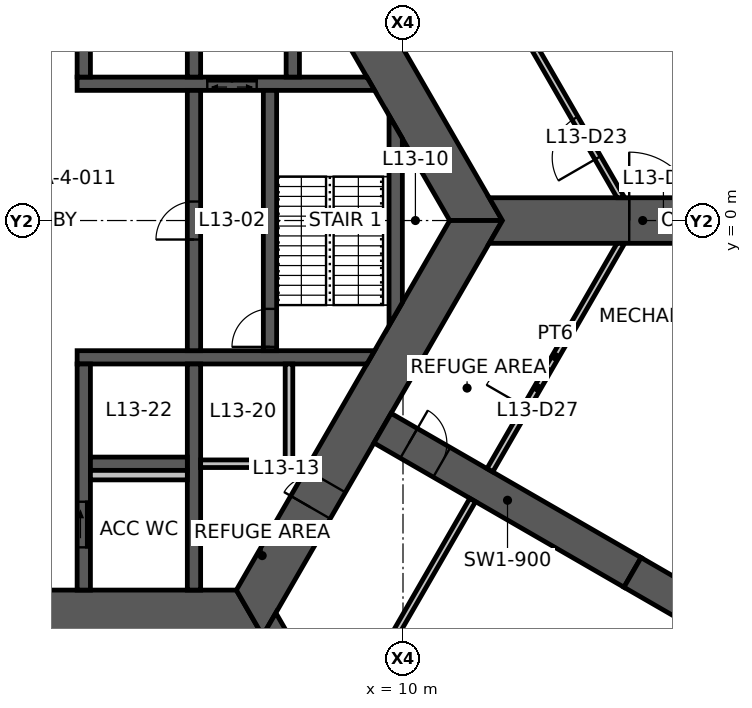
"""IFC4 building model, lengths in metres.
Left out: names, types, materials, properties, quantities, classifications, styles, units other than length and angle.
Written with IfcOpenShell. Run it as: python <this file> out.ifc"""

import sys

from ifc_helpers import new_model, si_unit, direction, frame, frame_2d, origin, place, context, subcontext, project, spatial, polyline, rectangle, outline, extrude, element, fill, save


model = new_model("IFC4")
c1 = context("Model", 3, precision=1e-05, world=origin(), true_north=direction((0.0, 1.0)))
c2 = subcontext(c1, "Body", "Model", "MODEL_VIEW")
j1 = project(units=[si_unit("LENGTHUNIT", "METRE"), si_unit("PLANEANGLEUNIT", "RADIAN")], contexts=[c1])
p1 = place(None, origin())
s1 = spatial("IfcSite", under=j1, at=p1, CompositionType="ELEMENT")
p2 = place(p1, origin())
s2 = spatial("IfcBuilding", under=s1, at=p2, CompositionType="ELEMENT")
p3 = place(p2, frame((0.0, 0.0, 52.0)))
s3 = spatial("IfcBuildingStorey", under=s2, at=p3, CompositionType="ELEMENT", Elevation=52.0)
p4 = place(p3, frame((11.922, 0.0, 0.0), z_axis=(0.0, 0.0, 1.0), x_axis=(-0.500004296715, 0.866022923061, 0.0)))
e1 = element("IfcWall", 1, at=p4, inside=s3, PredefinedType="SHEAR", context=c2, shape_type="SweptSolid", body=[
    extrude(outline(polyline([(-0.346, -0.6), (5.835, -0.6), (6.635, -0.6), (12.269, -0.6), (11.576, 0.6), (6.635, 0.6), (5.835, 0.6), (0.346, 0.6), (-0.346, -0.6)])), origin(), (0.0, 0.0, 1.0), 5.0),
])
p5 = place(p4, frame((5.835, 0.0, 0.0)))
e2 = element("IfcOpeningElement", 2, at=p5, cuts=e1, PredefinedType="OPENING", context=c2, shape_type="SweptSolid", body=[
    extrude(rectangle(XDim=0.8, YDim=2.1, at=frame_2d((0.4, 1.05))), frame((0.0, 0.61, 0.0), z_axis=(0.0, -1.0, 0.0), x_axis=(1.0, 0.0, 0.0)), (0.0, 0.0, 1.0), 1.22),
])
p6 = place(p3, frame((-5.961, -10.325, 0.0), z_axis=(0.0, 0.0, 1.0), x_axis=(1.0, 0.0, 0.0)))
e3 = element("IfcWall", 3, at=p6, inside=s3, PredefinedType="SHEAR", context=c2, shape_type="SweptSolid", body=[
    extrude(outline(polyline([(-0.346, -0.6), (5.461, -0.6), (6.461, -0.6), (12.269, -0.6), (11.576, 0.6), (6.461, 0.6), (5.461, 0.6), (0.346, 0.6), (-0.346, -0.6)])), origin(), (0.0, 0.0, 1.0), 5.0),
])
p7 = place(p6, frame((5.461, 0.0, 0.0)))
e4 = element("IfcOpeningElement", 4, at=p7, cuts=e3, PredefinedType="OPENING", context=c2, shape_type="SweptSolid", body=[
    extrude(rectangle(XDim=1.0, YDim=2.1, at=frame_2d((0.5, 1.05))), frame((0.0, 0.61, 0.0), z_axis=(0.0, -1.0, 0.0), x_axis=(1.0, 0.0, 0.0)), (0.0, 0.0, 1.0), 1.22),
])
p8 = place(p3, frame((5.961, -10.325, 0.0), z_axis=(0.0, 0.0, 1.0), x_axis=(0.500004296715, 0.866022923061, 0.0)))
e5 = element("IfcWall", 5, at=p8, inside=s3, PredefinedType="SHEAR", context=c2, shape_type="SweptSolid", body=[
    extrude(outline(polyline([(-0.346, -0.6), (3.208, -0.6), (4.009, -0.6), (12.269, -0.6), (11.576, 0.6), (4.009, 0.6), (3.208, 0.6), (0.346, 0.6), (-0.346, -0.6)])), origin(), (0.0, 0.0, 1.0), 5.0),
])
p9 = place(p8, frame((3.208, 0.0, 0.0)))
e6 = element("IfcOpeningElement", 6, at=p9, cuts=e5, PredefinedType="OPENING", context=c2, shape_type="SweptSolid", body=[
    extrude(rectangle(XDim=0.8, YDim=2.1, at=frame_2d((0.4, 1.05))), frame((0.0, 0.61, 0.0), z_axis=(0.0, -1.0, 0.0), x_axis=(1.0, 0.0, 0.0)), (0.0, 0.0, 1.0), 1.22),
])
p10 = place(p3, frame((9.461, -5.462, 0.0), z_axis=(0.0, 0.0, 1.0), x_axis=(0.866019116917, -0.500010889016, 0.0)))
e7 = element("IfcWall", 7, at=p10, inside=s3, PredefinedType="SHEAR", context=c2, shape_type="SweptSolid", body=[
    extrude(rectangle(XDim=7.595, YDim=0.9, at=frame_2d((3.798, 0.0))), origin(), (0.0, 0.0, 1.0), 5.0),
])
p11 = place(p10, frame((0.8, 0.0, 0.0)))
e8 = element("IfcOpeningElement", 8, at=p11, cuts=e7, PredefinedType="OPENING", context=c2, shape_type="SweptSolid", body=[
    extrude(rectangle(XDim=1.0, YDim=2.1, at=frame_2d((0.5, 1.05))), frame((0.0, 0.46, 0.0), z_axis=(0.0, -1.0, 0.0), x_axis=(1.0, 0.0, 0.0)), (0.0, 0.0, 1.0), 0.92),
])
p12 = place(p3, frame((16.039, -9.26, 0.0), z_axis=(0.0, 0.0, 1.0), x_axis=(0.866024837091, -0.50000098154, 0.0)))
e9 = element("IfcWall", 9, at=p12, inside=s3, PredefinedType="SHEAR", context=c2, shape_type="SweptSolid", body=[
    extrude(rectangle(XDim=13.0, YDim=0.9, at=frame_2d((6.5, 0.0))), origin(), (0.0, 0.0, 1.0), 5.0),
])
p13 = place(p3, frame((12.615, 0.0, -1.15), z_axis=(0.0, 0.0, 1.0), x_axis=(1.0, 0.0, 0.0)))
e10 = element("IfcWall", 10, at=p13, inside=s3, PredefinedType="SHEAR", context=c2, shape_type="SweptSolid", body=[
    extrude(outline(polyline([(-0.346, -0.6), (3.338, -0.6), (5.138, -0.6), (7.385, -0.6), (7.385, 0.6), (5.138, 0.6), (3.338, 0.6), (-0.346, 0.6), (0.0, 0.0), (-0.346, -0.6)])), origin(), (0.0, 0.0, 1.0), 6.15),
])
p14 = place(p13, frame((3.338, 0.0, 1.15)))
e11 = element("IfcOpeningElement", 11, at=p14, cuts=e10, PredefinedType="OPENING", context=c2, shape_type="SweptSolid", body=[
    extrude(rectangle(XDim=1.8, YDim=2.4, at=frame_2d((0.9, 1.2))), frame((0.0, 0.61, 0.0), z_axis=(0.0, -1.0, 0.0), x_axis=(1.0, 0.0, 0.0)), (0.0, 0.0, 1.0), 1.22),
])
p15 = place(p3, frame((6.308, -10.925, -1.15), z_axis=(0.0, 0.0, 1.0), x_axis=(0.499993363642, -0.866029235253, 0.0)))
e12 = element("IfcWall", 12, at=p15, inside=s3, PredefinedType="SHEAR", context=c2, shape_type="SweptSolid", body=[
    extrude(outline(polyline([(-0.346, -0.6), (7.385, -0.6), (7.385, 0.6), (-0.346, 0.6), (0.0, 0.0), (-0.346, -0.6)])), origin(), (0.0, 0.0, 1.0), 6.15),
])
p16 = place(p3, frame((20.389, 0.526, 0.0), z_axis=(0.0, 0.0, 1.0), x_axis=(-0.499999841607, 0.866025495233, 0.0)))
e13 = element("IfcWall", 13, at=p16, inside=s3, PredefinedType="ELEMENTEDWALL", context=c2, shape_type="SweptSolid", body=[
    extrude(rectangle(XDim=19.479, YDim=0.2, at=frame_2d((9.739, 0.0))), origin(), (0.0, 0.0, 1.0), 5.0),
])
p17 = place(p3, frame((1.425, 3.6, 0.0), z_axis=(0.0, 0.0, 1.0), x_axis=(1.0, 0.0, 0.0)))
e14 = element("IfcWall", 14, at=p17, inside=s3, PredefinedType="SHEAR", context=c2, shape_type="SweptSolid", body=[
    extrude(outline(polyline([(0.0, -0.175), (3.425, -0.175), (4.725, -0.175), (7.827, -0.175), (7.625, 0.175), (4.725, 0.175), (3.425, 0.175), (0.0, 0.175), (0.0, -0.175)])), origin(), (0.0, 0.0, 1.0), 5.0),
])
p18 = place(p17, frame((3.425, 0.0, 0.0)))
e15 = element("IfcOpeningElement", 15, at=p18, cuts=e14, PredefinedType="OPENING", context=c2, shape_type="SweptSolid", body=[
    extrude(rectangle(XDim=1.3, YDim=2.1, at=frame_2d((0.65, 1.05))), frame((0.0, 0.185, 0.0), z_axis=(0.0, -1.0, 0.0), x_axis=(1.0, 0.0, 0.0)), (0.0, 0.0, 1.0), 0.37),
])
p19 = place(p3, frame((1.425, -3.6, 0.0), z_axis=(0.0, 0.0, 1.0), x_axis=(1.0, 0.0, 0.0)))
e16 = element("IfcWall", 16, at=p19, inside=s3, PredefinedType="SHEAR", context=c2, shape_type="SweptSolid", body=[
    extrude(outline(polyline([(0.0, -0.175), (7.625, -0.175), (7.827, 0.175), (0.0, 0.175), (0.0, -0.175)])), origin(), (0.0, 0.0, 1.0), 5.0),
])
p20 = place(p3, frame((1.6, 3.775, 0.0), z_axis=(0.0, 0.0, 1.0), x_axis=(0.0, 1.0, 0.0)))
e17 = element("IfcWall", 17, at=p20, inside=s3, PredefinedType="SHEAR", context=c2, shape_type="SweptSolid", body=[
    extrude(rectangle(XDim=5.95, YDim=0.35, at=frame_2d((2.975, 0.0))), origin(), (0.0, 0.0, 1.0), 5.0),
])
p21 = place(p20, frame((3.775, 0.0, 0.0)))
e18 = element("IfcOpeningElement", 18, at=p21, cuts=e17, PredefinedType="OPENING", context=c2, shape_type="SweptSolid", body=[
    extrude(rectangle(XDim=0.9, YDim=2.1, at=frame_2d((0.45, 1.05))), frame((0.0, 0.185, 0.0), z_axis=(0.0, -1.0, 0.0), x_axis=(1.0, 0.0, 0.0)), (0.0, 0.0, 1.0), 0.37),
])
p22 = place(p3, frame((1.6, -3.775, 0.0), z_axis=(0.0, 0.0, 1.0), x_axis=(0.0, -1.0, 0.0)))
e19 = element("IfcWall", 19, at=p22, inside=s3, PredefinedType="SHEAR", context=c2, shape_type="SweptSolid", body=[
    extrude(rectangle(XDim=5.95, YDim=0.35, at=frame_2d((2.975, 0.0))), origin(), (0.0, 0.0, 1.0), 5.0),
])
p23 = place(p22, frame((3.625, 0.0, 0.0)))
e20 = element("IfcOpeningElement", 20, at=p23, cuts=e19, PredefinedType="OPENING", context=c2, shape_type="SweptSolid", body=[
    extrude(rectangle(XDim=1.2, YDim=2.1, at=frame_2d((0.6, 1.05))), frame((0.0, 0.185, 0.0), z_axis=(0.0, -1.0, 0.0), x_axis=(1.0, 0.0, 0.0)), (0.0, 0.0, 1.0), 0.37),
])
p24 = place(p3, frame((4.5, -3.425, 0.0), z_axis=(0.0, 0.0, 1.0), x_axis=(0.0, 1.0, 0.0)))
e21 = element("IfcWall", 21, at=p24, inside=s3, PredefinedType="SHEAR", context=c2, shape_type="SweptSolid", body=[
    extrude(rectangle(XDim=6.85, YDim=0.35, at=frame_2d((3.425, 0.0))), origin(), (0.0, 0.0, 1.0), 5.0),
])
p25 = place(p24, frame((2.925, 0.0, 0.0)))
e22 = element("IfcOpeningElement", 22, at=p25, cuts=e21, PredefinedType="OPENING", context=c2, shape_type="SweptSolid", body=[
    extrude(rectangle(XDim=1.0, YDim=2.1, at=frame_2d((0.5, 1.05))), frame((0.0, 0.185, 0.0), z_axis=(0.0, -1.0, 0.0), x_axis=(1.0, 0.0, 0.0)), (0.0, 0.0, 1.0), 0.37),
])
p26 = place(p3, frame((6.5, -3.425, 0.0), z_axis=(0.0, 0.0, 1.0), x_axis=(0.0, 1.0, 0.0)))
e23 = element("IfcWall", 23, at=p26, inside=s3, PredefinedType="SHEAR", context=c2, shape_type="SweptSolid", body=[
    extrude(rectangle(XDim=6.85, YDim=0.35, at=frame_2d((3.425, 0.0))), origin(), (0.0, 0.0, 1.0), 5.0),
])
p27 = place(p26, frame((0.1, 0.0, 0.0)))
e24 = element("IfcOpeningElement", 24, at=p27, cuts=e23, PredefinedType="OPENING", context=c2, shape_type="SweptSolid", body=[
    extrude(rectangle(XDim=1.0, YDim=2.1, at=frame_2d((0.5, 1.05))), frame((0.0, 0.185, 0.0), z_axis=(0.0, -1.0, 0.0), x_axis=(1.0, 0.0, 0.0)), (0.0, 0.0, 1.0), 0.37),
])
p28 = place(p3, frame((4.5, 3.775, 0.0), z_axis=(0.0, 0.0, 1.0), x_axis=(0.0, 1.0, 0.0)))
e25 = element("IfcWall", 25, at=p28, inside=s3, PredefinedType="SHEAR", context=c2, shape_type="SweptSolid", body=[
    extrude(rectangle(XDim=3.4, YDim=0.35, at=frame_2d((1.7, 0.0))), origin(), (0.0, 0.0, 1.0), 5.0),
])
p29 = place(p3, frame((4.5, -3.775, 0.0), z_axis=(0.0, 0.0, 1.0), x_axis=(0.0, -1.0, 0.0)))
e26 = element("IfcWall", 26, at=p29, inside=s3, PredefinedType="SHEAR", context=c2, shape_type="SweptSolid", body=[
    extrude(rectangle(XDim=5.95, YDim=0.35, at=frame_2d((2.975, 0.0))), origin(), (0.0, 0.0, 1.0), 5.0),
])
p30 = place(p3, frame((1.775, -6.4, 0.0), z_axis=(0.0, 0.0, 1.0), x_axis=(1.0, 0.0, 0.0)))
e27 = element("IfcWall", 27, at=p30, inside=s3, PredefinedType="SHEAR", context=c2, shape_type="SweptSolid", body=[
    extrude(rectangle(XDim=2.55, YDim=0.35, at=frame_2d((1.275, 0.0))), origin(), (0.0, 0.0, 1.0), 5.0),
])
p31 = place(p3, frame((7.1, 3.775, 0.0), z_axis=(0.0, 0.0, 1.0), x_axis=(0.0, 1.0, 0.0)))
e28 = element("IfcWall", 28, at=p31, inside=s3, PredefinedType="SHEAR", context=c2, shape_type="SweptSolid", body=[
    extrude(outline(polyline([(0.0, -0.175), (3.074, -0.175), (3.377, 0.0), (3.4, 0.175), (0.0, 0.175), (0.0, -0.175)])), origin(), (0.0, 0.0, 1.0), 5.0),
])
p32 = place(p3, frame((9.808, -2.462, 0.0), z_axis=(0.0, 0.0, 1.0), x_axis=(0.0, 1.0, 0.0)))
e29 = element("IfcWall", 29, at=p32, inside=s3, PredefinedType="SHEAR", context=c2, shape_type="SweptSolid", body=[
    extrude(outline(polyline([(0.303, -0.175), (4.621, -0.175), (5.228, 0.175), (-0.303, 0.175), (0.303, -0.175)])), origin(), (0.0, 0.0, 1.0), 5.0),
])
p33 = place(p3, frame((4.675, -6.4, 0.0), z_axis=(0.0, 0.0, 1.0), x_axis=(1.0, 0.0, 0.0)))
e30 = element("IfcWall", 30, at=p33, inside=s3, PredefinedType="STANDARD", context=c2, shape_type="SweptSolid", body=[
    extrude(rectangle(XDim=2.425, YDim=0.2, at=frame_2d((1.212, 0.0))), origin(), (0.0, 0.0, 1.0), 5.0),
])
p34 = place(p3, frame((7.0, -3.775, 0.0), z_axis=(0.0, 0.0, 1.0), x_axis=(0.0, -1.0, 0.0)))
e31 = element("IfcWall", 31, at=p34, inside=s3, PredefinedType="STANDARD", context=c2, shape_type="SweptSolid", body=[
    extrude(rectangle(XDim=2.525, YDim=0.2, at=frame_2d((1.263, 0.0))), origin(), (0.0, 0.0, 1.0), 5.0),
])
p35 = place(p3, frame((1.775, -6.7, 0.0), z_axis=(0.0, 0.0, 1.0), x_axis=(1.0, 0.0, 0.0)))
e32 = element("IfcWall", 32, at=p35, inside=s3, PredefinedType="PLUMBINGWALL", context=c2, shape_type="SweptSolid", body=[
    extrude(rectangle(XDim=2.55, YDim=0.25, at=frame_2d((1.275, 0.0))), origin(), (0.0, 0.0, 1.0), 5.0),
])
p36 = place(p3, frame((15.733, 0.6, 0.0), z_axis=(0.0, 0.0, 1.0), x_axis=(-0.49999908555, 0.866025931742, 0.0)))
e33 = element("IfcWall", 33, at=p36, inside=s3, PredefinedType="PARTITIONING", context=c2, shape_type="SweptSolid", body=[
    extrude(outline(polyline([(-0.051, -0.087), (1.213, -0.087), (2.413, -0.087), (14.744, -0.087), (14.643, 0.087), (2.413, 0.087), (1.213, 0.087), (0.051, 0.087), (-0.051, -0.087)])), origin(), (0.0, 0.0, 1.0), 4.83),
])
p37 = place(p36, frame((1.213, 0.0, 0.0)))
e34 = element("IfcOpeningElement", 34, at=p37, cuts=e33, PredefinedType="OPENING", context=c2, shape_type="SweptSolid", body=[
    extrude(rectangle(XDim=1.2, YDim=2.1, at=frame_2d((0.6, 1.05))), frame((0.0, 0.098, 0.0), z_axis=(0.0, -1.0, 0.0), x_axis=(1.0, 0.0, 0.0)), (0.0, 0.0, 1.0), 0.195),
])
p38 = place(p3, frame((12.287, -6.569, 0.0), z_axis=(0.0, 0.0, 1.0), x_axis=(0.49998719302, 0.866032797772, 0.0)))
e35 = element("IfcWall", 35, at=p38, inside=s3, PredefinedType="PARTITIONING", context=c2, shape_type="SweptSolid", body=[
    extrude(outline(polyline([(0.0, -0.087), (1.9, -0.087), (3.1, -0.087), (6.942, -0.087), (6.841, 0.087), (3.1, 0.087), (1.9, 0.087), (0.0, 0.087), (0.0, -0.087)])), origin(), (0.0, 0.0, 1.0), 4.83),
])
p39 = place(p38, frame((1.9, 0.0, 0.0)))
e36 = element("IfcOpeningElement", 36, at=p39, cuts=e35, PredefinedType="OPENING", context=c2, shape_type="SweptSolid", body=[
    extrude(rectangle(XDim=1.2, YDim=2.1, at=frame_2d((0.6, 1.05))), frame((0.0, 0.098, 0.0), z_axis=(0.0, -1.0, 0.0), x_axis=(1.0, 0.0, 0.0)), (0.0, 0.0, 1.0), 0.195),
])
p40 = place(p3, frame((8.386, -13.325, 0.0), z_axis=(0.0, 0.0, 1.0), x_axis=(0.49998719302, 0.866032797772, 0.0)))
e37 = element("IfcWall", 37, at=p40, inside=s3, PredefinedType="PARTITIONING", context=c2, shape_type="SweptSolid", body=[
    extrude(outline(polyline([(-0.051, -0.087), (6.892, -0.087), (6.892, 0.087), (0.051, 0.087), (-0.051, -0.087)])), origin(), (0.0, 0.0, 1.0), 4.83),
])
p41 = place(p9, origin())
e38 = element("IfcDoor", 38, at=p41, inside=s3, OperationType="SINGLE_SWING_LEFT", PredefinedType="DOOR", context=c2, shape_type="SweptSolid", body=[
    extrude(rectangle(XDim=0.8, YDim=2.1, at=frame_2d((0.4, 1.05))), frame((0.0, 0.025, 0.0), z_axis=(0.0, -1.0, 0.0), x_axis=(1.0, 0.0, 0.0)), (0.0, 0.0, 1.0), 0.05),
])
fill(e6, e38)
p42 = place(p25, origin())
e39 = element("IfcDoor", 39, at=p42, inside=s3, OperationType="SINGLE_SWING_LEFT", PredefinedType="DOOR", context=c2, shape_type="SweptSolid", body=[
    extrude(rectangle(XDim=1.0, YDim=2.1, at=frame_2d((0.5, 1.05))), frame((0.0, 0.025, 0.0), z_axis=(0.0, -1.0, 0.0), x_axis=(1.0, 0.0, 0.0)), (0.0, 0.0, 1.0), 0.05),
])
fill(e22, e39)
p43 = place(p27, origin())
e40 = element("IfcDoor", 40, at=p43, inside=s3, OperationType="SINGLE_SWING_LEFT", PredefinedType="DOOR", context=c2, shape_type="SweptSolid", body=[
    extrude(rectangle(XDim=1.0, YDim=2.1, at=frame_2d((0.5, 1.05))), frame((0.0, 0.025, 0.0), z_axis=(0.0, -1.0, 0.0), x_axis=(1.0, 0.0, 0.0)), (0.0, 0.0, 1.0), 0.05),
])
fill(e24, e40)
p44 = place(p23, origin())
e41 = element("IfcDoor", 41, at=p44, inside=s3, OperationType="SLIDING_TO_LEFT", PredefinedType="DOOR", context=c2, shape_type="SweptSolid", body=[
    extrude(rectangle(XDim=1.2, YDim=2.1, at=frame_2d((0.6, 1.05))), frame((0.0, 0.025, 0.0), z_axis=(0.0, -1.0, 0.0), x_axis=(1.0, 0.0, 0.0)), (0.0, 0.0, 1.0), 0.05),
])
fill(e20, e41)
p45 = place(p11, origin())
e42 = element("IfcDoor", 42, at=p45, inside=s3, OperationType="SINGLE_SWING_LEFT", PredefinedType="DOOR", context=c2, shape_type="SweptSolid", body=[
    extrude(rectangle(XDim=1.0, YDim=2.1, at=frame_2d((0.5, 1.05))), frame((0.0, 0.025, 0.0), z_axis=(0.0, -1.0, 0.0), x_axis=(1.0, 0.0, 0.0)), (0.0, 0.0, 1.0), 0.05),
])
fill(e8, e42)
p46 = place(p14, origin())
e43 = element("IfcDoor", 43, at=p46, inside=s3, OperationType="DOUBLE_DOOR_SINGLE_SWING", PredefinedType="DOOR", context=c2, shape_type="SweptSolid", body=[
    extrude(rectangle(XDim=1.8, YDim=2.4, at=frame_2d((0.9, 1.2))), frame((0.0, 0.025, 0.0), z_axis=(0.0, -1.0, 0.0), x_axis=(1.0, 0.0, 0.0)), (0.0, 0.0, 1.0), 0.05),
])
fill(e11, e43)
p47 = place(p37, origin())
e44 = element("IfcDoor", 44, at=p47, inside=s3, OperationType="DOUBLE_DOOR_SINGLE_SWING", PredefinedType="DOOR", context=c2, shape_type="SweptSolid", body=[
    extrude(rectangle(XDim=1.2, YDim=2.1, at=frame_2d((0.6, 1.05))), frame((0.0, 0.025, 0.0), z_axis=(0.0, -1.0, 0.0), x_axis=(1.0, 0.0, 0.0)), (0.0, 0.0, 1.0), 0.05),
])
fill(e34, e44)
p48 = place(p39, origin())
e45 = element("IfcDoor", 45, at=p48, inside=s3, OperationType="DOUBLE_DOOR_SINGLE_SWING", PredefinedType="DOOR", context=c2, shape_type="SweptSolid", body=[
    extrude(rectangle(XDim=1.2, YDim=2.1, at=frame_2d((0.6, 1.05))), frame((0.0, 0.025, 0.0), z_axis=(0.0, -1.0, 0.0), x_axis=(1.0, 0.0, 0.0)), (0.0, 0.0, 1.0), 0.05),
])
fill(e36, e45)
p49 = place(p18, origin())
e46 = element("IfcDoor", 46, at=p49, inside=s3, OperationType="DOUBLE_DOOR_SLIDING", PredefinedType="DOOR", context=c2, shape_type="SweptSolid", body=[
    extrude(rectangle(XDim=1.3, YDim=2.1, at=frame_2d((0.65, 1.05))), frame((0.0, 0.025, 0.0), z_axis=(0.0, -1.0, 0.0), x_axis=(1.0, 0.0, 0.0)), (0.0, 0.0, 1.0), 0.05),
])
fill(e15, e46)
save(model, sys.argv[1])
